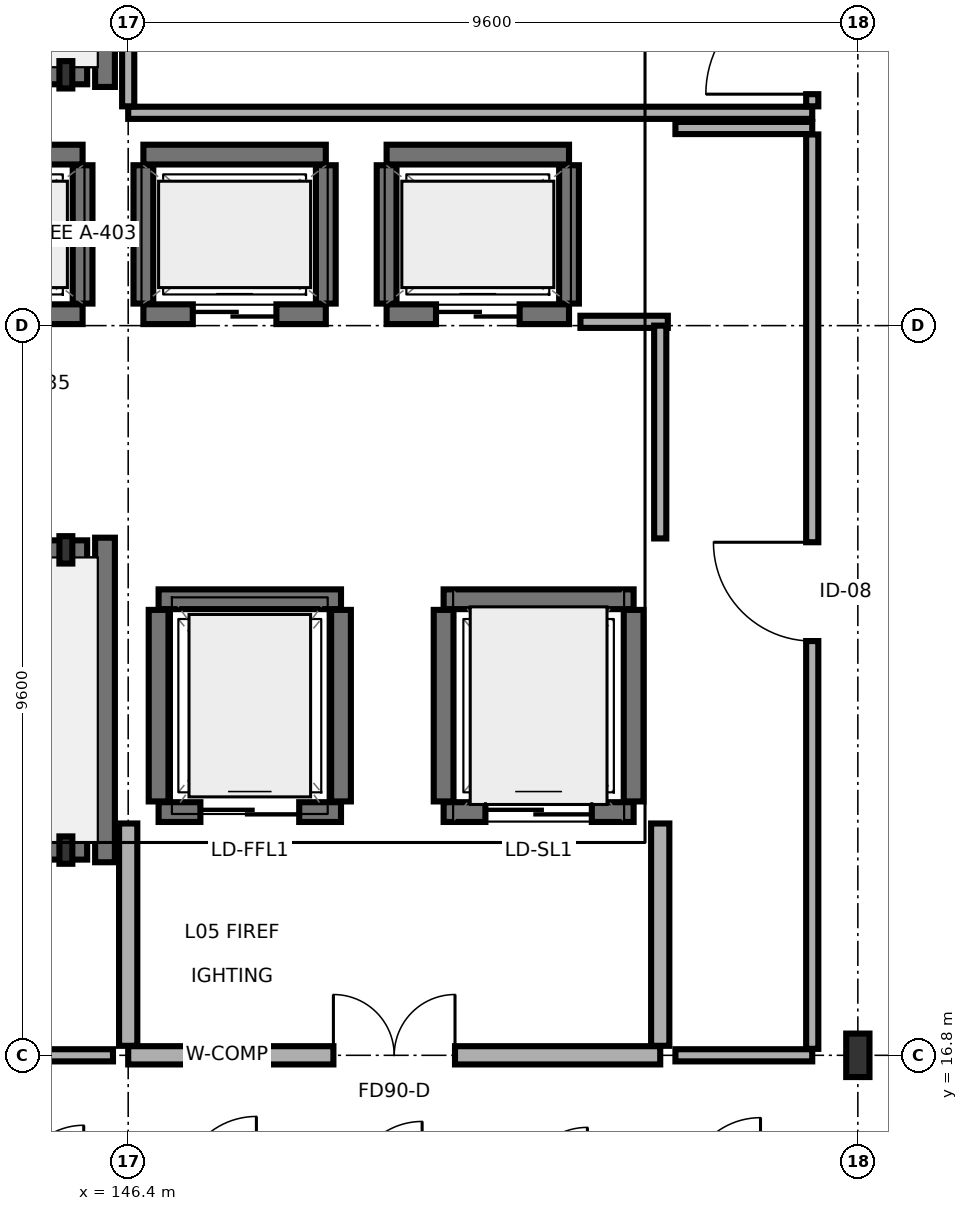
"""IFC4 building model, lengths in metres.
Left out: names, types, materials, properties, quantities, classifications, styles, units other than length and angle.
Written with IfcOpenShell. Run it as: python <this file> out.ifc"""

import sys

from ifc_helpers import new_model, si_unit, direction, frame, frame_2d, origin, origin_2d, place, context, subcontext, project, spatial, rectangle, i_section, extrude, element, fill, save


model = new_model("IFC4")
c1 = context("Model", 3, precision=1e-05, world=origin(), true_north=direction((0.0, 1.0)))
c2 = subcontext(c1, "Body", "Model", "MODEL_VIEW")
j1 = project(units=[si_unit("LENGTHUNIT", "METRE"), si_unit("PLANEANGLEUNIT", "RADIAN")], contexts=[c1])
p1 = place(None, origin())
s1 = spatial("IfcSite", under=j1, at=p1, CompositionType="ELEMENT")
p2 = place(p1, origin())
s2 = spatial("IfcBuilding", under=s1, at=p2, CompositionType="ELEMENT")
p3 = place(p2, frame((0.0, 0.0, 18.1)))
s3 = spatial("IfcBuildingStorey", under=s2, at=p3, CompositionType="ELEMENT", Elevation=18.1)
p4 = place(p3, frame((156.0, 16.8, 0.0), z_axis=(0.0, 0.0, 1.0), x_axis=(1.0, 0.0, 0.0)))
e1 = element("IfcColumn", 1, at=p4, inside=s3, PredefinedType="COLUMN", context=c2, shape_type="SweptSolid", body=[
    extrude(i_section(OverallWidth=0.306, OverallDepth=0.572, WebThickness=0.021, FlangeThickness=0.04, FilletRadius=0.027, at=origin_2d()), origin(), (0.0, 0.0, 1.0), 3.4),
])
for number, where, z_axis, x_axis in (
    (2, (145.58, 19.5, 0.0), (0.0, 0.0, 1.0), (1.0, 0.0, 0.0)),
    (3, (145.58, 23.45, 0.0), (0.0, 0.0, 1.0), (1.0, 0.0, 0.0)),
    (4, (145.58, 29.7, 0.0), (0.0, 0.0, 1.0), (1.0, 0.0, 0.0)),
):
    element("IfcColumn", number, at=place(p3, frame(where, z_axis=z_axis, x_axis=x_axis)), inside=s3, PredefinedType="PILASTER", context=c2, shape_type="SweptSolid", body=[
        extrude(i_section(OverallWidth=0.17, OverallDepth=0.36, WebThickness=0.008, FlangeThickness=0.013, FilletRadius=0.018, at=origin_2d()), origin(), (0.0, 0.0, 1.0), 3.4),
    ])
p5 = place(p3, frame((146.095, 19.34, 0.0), z_axis=(0.0, 0.0, 1.0), x_axis=(0.0, 1.0, 0.0)))
e5 = element("IfcWall", 5, at=p5, inside=s3, PredefinedType="SHEAR", context=c2, shape_type="SweptSolid", body=[
    extrude(rectangle(XDim=4.27, YDim=0.26, at=frame_2d((2.135, 0.0))), origin(), (0.0, 0.0, 1.0), 3.21),
])
for number, where, z_axis, x_axis in (
    (6, (137.34, 19.505, 0.0), (0.0, 0.0, 1.0), (1.0, 0.0, 0.0)),
    (7, (137.34, 23.445, 0.0), (0.0, 0.0, 1.0), (1.0, 0.0, 0.0)),
):
    element("IfcWall", number, at=place(p3, frame(where, z_axis=z_axis, x_axis=x_axis)), inside=s3, PredefinedType="SHEAR", context=c2, shape_type="SweptSolid", body=[
        extrude(rectangle(XDim=8.52, YDim=0.26, at=frame_2d((4.26, 0.0))), origin(), (0.0, 0.0, 1.0), 3.21),
    ])
p6 = place(p3, frame((146.095, 29.54, 0.0), z_axis=(0.0, 0.0, 1.0), x_axis=(0.0, 1.0, 0.0)))
e8 = element("IfcWall", 8, at=p6, inside=s3, PredefinedType="SHEAR", context=c2, shape_type="SweptSolid", body=[
    extrude(rectangle(XDim=4.635, YDim=0.26, at=frame_2d((2.317, 0.0))), origin(), (0.0, 0.0, 1.0), 3.21),
])
p7 = place(p3, frame((137.34, 29.705, 0.0), z_axis=(0.0, 0.0, 1.0), x_axis=(1.0, 0.0, 0.0)))
e9 = element("IfcWall", 9, at=p7, inside=s3, PredefinedType="SHEAR", context=c2, shape_type="SweptSolid", body=[
    extrude(rectangle(XDim=8.52, YDim=0.26, at=frame_2d((4.26, 0.0))), origin(), (0.0, 0.0, 1.0), 3.21),
])
p8 = place(p3, frame((143.4, 26.55, 0.0), z_axis=(0.0, 0.0, 1.0), x_axis=(1.0, 0.0, 0.0)))
e10 = element("IfcWall", 10, at=p8, inside=s3, PredefinedType="SHEAR", context=c2, shape_type="SweptSolid", body=[
    extrude(rectangle(XDim=2.4, YDim=0.26, at=frame_2d((1.2, 0.0))), origin(), (0.0, 0.0, 1.0), 3.21),
])
p9 = place(p8, frame((0.65, 0.0, 0.0)))
e11 = element("IfcOpeningElement", 11, at=p9, cuts=e10, PredefinedType="OPENING", context=c2, shape_type="SweptSolid", body=[
    extrude(rectangle(XDim=1.1, YDim=2.2, at=frame_2d((0.55, 1.1))), frame((0.0, 0.14, 0.0), z_axis=(0.0, -1.0, 0.0), x_axis=(1.0, 0.0, 0.0)), (0.0, 0.0, 1.0), 0.28),
])
p10 = place(p3, frame((143.4, 28.65, 0.0), z_axis=(0.0, 0.0, 1.0), x_axis=(1.0, 0.0, 0.0)))
e12 = element("IfcWall", 12, at=p10, inside=s3, PredefinedType="SHEAR", context=c2, shape_type="SweptSolid", body=[
    extrude(rectangle(XDim=2.4, YDim=0.26, at=frame_2d((1.2, 0.0))), origin(), (0.0, 0.0, 1.0), 3.21),
])
p11 = place(p3, frame((145.8, 26.69, 0.0), z_axis=(0.0, 0.0, 1.0), x_axis=(0.0, 1.0, 0.0)))
e13 = element("IfcWall", 13, at=p11, inside=s3, PredefinedType="SHEAR", context=c2, shape_type="SweptSolid", body=[
    extrude(rectangle(XDim=1.82, YDim=0.26, at=frame_2d((0.91, 0.0))), origin(), (0.0, 0.0, 1.0), 3.21),
])
p12 = place(p3, frame((146.6, 26.55, 0.0), z_axis=(0.0, 0.0, 1.0), x_axis=(1.0, 0.0, 0.0)))
e14 = element("IfcWall", 14, at=p12, inside=s3, PredefinedType="SHEAR", context=c2, shape_type="SweptSolid", body=[
    extrude(rectangle(XDim=2.4, YDim=0.26, at=frame_2d((1.2, 0.0))), origin(), (0.0, 0.0, 1.0), 3.21),
])
p13 = place(p12, frame((0.65, 0.0, 0.0)))
e15 = element("IfcOpeningElement", 15, at=p13, cuts=e14, PredefinedType="OPENING", context=c2, shape_type="SweptSolid", body=[
    extrude(rectangle(XDim=1.1, YDim=2.2, at=frame_2d((0.55, 1.1))), frame((0.0, 0.14, 0.0), z_axis=(0.0, -1.0, 0.0), x_axis=(1.0, 0.0, 0.0)), (0.0, 0.0, 1.0), 0.28),
])
p14 = place(p3, frame((146.6, 28.65, 0.0), z_axis=(0.0, 0.0, 1.0), x_axis=(1.0, 0.0, 0.0)))
e16 = element("IfcWall", 16, at=p14, inside=s3, PredefinedType="SHEAR", context=c2, shape_type="SweptSolid", body=[
    extrude(rectangle(XDim=2.4, YDim=0.26, at=frame_2d((1.2, 0.0))), origin(), (0.0, 0.0, 1.0), 3.21),
])
for number, where, z_axis, x_axis in (
    (17, (146.6, 26.69, 0.0), (0.0, 0.0, 1.0), (0.0, 1.0, 0.0)),
    (18, (149.0, 26.69, 0.0), (0.0, 0.0, 1.0), (0.0, 1.0, 0.0)),
):
    element("IfcWall", number, at=place(p3, frame(where, z_axis=z_axis, x_axis=x_axis)), inside=s3, PredefinedType="SHEAR", context=c2, shape_type="SweptSolid", body=[
        extrude(rectangle(XDim=1.82, YDim=0.26, at=frame_2d((0.91, 0.0))), origin(), (0.0, 0.0, 1.0), 3.21),
    ])
p15 = place(p3, frame((149.8, 26.55, 0.0), z_axis=(0.0, 0.0, 1.0), x_axis=(1.0, 0.0, 0.0)))
e19 = element("IfcWall", 19, at=p15, inside=s3, PredefinedType="SHEAR", context=c2, shape_type="SweptSolid", body=[
    extrude(rectangle(XDim=2.4, YDim=0.26, at=frame_2d((1.2, 0.0))), origin(), (0.0, 0.0, 1.0), 3.21),
])
p16 = place(p15, frame((0.65, 0.0, 0.0)))
e20 = element("IfcOpeningElement", 20, at=p16, cuts=e19, PredefinedType="OPENING", context=c2, shape_type="SweptSolid", body=[
    extrude(rectangle(XDim=1.1, YDim=2.2, at=frame_2d((0.55, 1.1))), frame((0.0, 0.14, 0.0), z_axis=(0.0, -1.0, 0.0), x_axis=(1.0, 0.0, 0.0)), (0.0, 0.0, 1.0), 0.28),
])
p17 = place(p3, frame((149.8, 28.65, 0.0), z_axis=(0.0, 0.0, 1.0), x_axis=(1.0, 0.0, 0.0)))
e21 = element("IfcWall", 21, at=p17, inside=s3, PredefinedType="SHEAR", context=c2, shape_type="SweptSolid", body=[
    extrude(rectangle(XDim=2.4, YDim=0.26, at=frame_2d((1.2, 0.0))), origin(), (0.0, 0.0, 1.0), 3.21),
])
for number, where, z_axis, x_axis in (
    (22, (149.8, 26.69, 0.0), (0.0, 0.0, 1.0), (0.0, 1.0, 0.0)),
    (23, (152.2, 26.69, 0.0), (0.0, 0.0, 1.0), (0.0, 1.0, 0.0)),
):
    element("IfcWall", number, at=place(p3, frame(where, z_axis=z_axis, x_axis=x_axis)), inside=s3, PredefinedType="SHEAR", context=c2, shape_type="SweptSolid", body=[
        extrude(rectangle(XDim=1.82, YDim=0.26, at=frame_2d((0.91, 0.0))), origin(), (0.0, 0.0, 1.0), 3.21),
    ])
p18 = place(p3, frame((146.8, 20.0, 0.0), z_axis=(0.0, 0.0, 1.0), x_axis=(1.0, 0.0, 0.0)))
e24 = element("IfcWall", 24, at=p18, inside=s3, PredefinedType="SHEAR", context=c2, shape_type="SweptSolid", body=[
    extrude(rectangle(XDim=2.4, YDim=0.26, at=frame_2d((1.2, 0.0))), origin(), (0.0, 0.0, 1.0), 3.21),
])
p19 = place(p18, frame((0.55, 0.0, 0.0)))
e25 = element("IfcOpeningElement", 25, at=p19, cuts=e24, PredefinedType="OPENING", context=c2, shape_type="SweptSolid", body=[
    extrude(rectangle(XDim=1.3, YDim=2.25, at=frame_2d((0.65, 1.125))), frame((0.0, 0.14, 0.0), z_axis=(0.0, -1.0, 0.0), x_axis=(1.0, 0.0, 0.0)), (0.0, 0.0, 1.0), 0.28),
])
p20 = place(p3, frame((146.8, 22.8, 0.0), z_axis=(0.0, 0.0, 1.0), x_axis=(1.0, 0.0, 0.0)))
e26 = element("IfcWall", 26, at=p20, inside=s3, PredefinedType="SHEAR", context=c2, shape_type="SweptSolid", body=[
    extrude(rectangle(XDim=2.4, YDim=0.26, at=frame_2d((1.2, 0.0))), origin(), (0.0, 0.0, 1.0), 3.21),
])
for number, where, z_axis, x_axis in (
    (27, (146.8, 20.14, 0.0), (0.0, 0.0, 1.0), (0.0, 1.0, 0.0)),
    (28, (149.2, 20.14, 0.0), (0.0, 0.0, 1.0), (0.0, 1.0, 0.0)),
):
    element("IfcWall", number, at=place(p3, frame(where, z_axis=z_axis, x_axis=x_axis)), inside=s3, PredefinedType="SHEAR", context=c2, shape_type="SweptSolid", body=[
        extrude(rectangle(XDim=2.52, YDim=0.26, at=frame_2d((1.26, 0.0))), origin(), (0.0, 0.0, 1.0), 3.21),
    ])
p21 = place(p3, frame((150.55, 20.0, 0.0), z_axis=(0.0, 0.0, 1.0), x_axis=(1.0, 0.0, 0.0)))
e29 = element("IfcWall", 29, at=p21, inside=s3, PredefinedType="SHEAR", context=c2, shape_type="SweptSolid", body=[
    extrude(rectangle(XDim=2.5, YDim=0.26, at=frame_2d((1.25, 0.0))), origin(), (0.0, 0.0, 1.0), 3.21),
])
p22 = place(p21, frame((0.55, 0.0, 0.0)))
e30 = element("IfcOpeningElement", 30, at=p22, cuts=e29, PredefinedType="OPENING", context=c2, shape_type="SweptSolid", body=[
    extrude(rectangle(XDim=1.4, YDim=2.3, at=frame_2d((0.7, 1.15))), frame((0.0, 0.14, 0.0), z_axis=(0.0, -1.0, 0.0), x_axis=(1.0, 0.0, 0.0)), (0.0, 0.0, 1.0), 0.28),
])
p23 = place(p3, frame((150.55, 22.8, 0.0), z_axis=(0.0, 0.0, 1.0), x_axis=(1.0, 0.0, 0.0)))
e31 = element("IfcWall", 31, at=p23, inside=s3, PredefinedType="SHEAR", context=c2, shape_type="SweptSolid", body=[
    extrude(rectangle(XDim=2.5, YDim=0.26, at=frame_2d((1.25, 0.0))), origin(), (0.0, 0.0, 1.0), 3.21),
])
for number, where, z_axis, x_axis in (
    (32, (150.55, 20.14, 0.0), (0.0, 0.0, 1.0), (0.0, 1.0, 0.0)),
    (33, (153.05, 20.14, 0.0), (0.0, 0.0, 1.0), (0.0, 1.0, 0.0)),
):
    element("IfcWall", number, at=place(p3, frame(where, z_axis=z_axis, x_axis=x_axis)), inside=s3, PredefinedType="SHEAR", context=c2, shape_type="SweptSolid", body=[
        extrude(rectangle(XDim=2.52, YDim=0.26, at=frame_2d((1.26, 0.0))), origin(), (0.0, 0.0, 1.0), 3.21),
    ])
p24 = place(p3, frame((146.4, 16.8, 0.0), z_axis=(0.0, 0.0, 1.0), x_axis=(1.0, 0.0, 0.0)))
e34 = element("IfcWall", 34, at=p24, inside=s3, PredefinedType="SOLIDWALL", context=c2, shape_type="SweptSolid", body=[
    extrude(rectangle(XDim=7.0, YDim=0.24, at=frame_2d((3.5, 0.0))), origin(), (0.0, 0.0, 1.0), 2.745),
])
p25 = place(p24, frame((2.7, 0.0, 0.0)))
e35 = element("IfcOpeningElement", 35, at=p25, cuts=e34, PredefinedType="OPENING", context=c2, shape_type="SweptSolid", body=[
    extrude(rectangle(XDim=1.6, YDim=2.2, at=frame_2d((0.8, 1.1))), frame((0.0, 0.13, 0.0), z_axis=(0.0, -1.0, 0.0), x_axis=(1.0, 0.0, 0.0)), (0.0, 0.0, 1.0), 0.26),
])
for number, where, z_axis, x_axis in (
    (36, (146.4, 16.925, 0.0), (0.0, 0.0, 1.0), (0.0, 1.0, 0.0)),
    (37, (153.4, 16.925, 0.0), (0.0, 0.0, 1.0), (0.0, 1.0, 0.0)),
):
    element("IfcWall", number, at=place(p3, frame(where, z_axis=z_axis, x_axis=x_axis)), inside=s3, PredefinedType="SOLIDWALL", context=c2, shape_type="SweptSolid", body=[
        extrude(rectangle(XDim=2.925, YDim=0.24, at=frame_2d((1.462, 0.0))), origin(), (0.0, 0.0, 1.0), 2.745),
    ])
p26 = place(p3, frame((140.55, 16.8, 0.0), z_axis=(0.0, 0.0, 1.0), x_axis=(1.0, 0.0, 0.0)))
e38 = element("IfcWall", 38, at=p26, inside=s3, PredefinedType="PARTITIONING", context=c2, shape_type="SweptSolid", body=[
    extrude(rectangle(XDim=5.65, YDim=0.16, at=frame_2d((2.825, 0.0))), origin(), (0.0, 0.0, 1.0), 2.745),
])
p27 = place(p26, frame((2.175, 0.0, 0.0)))
e39 = element("IfcOpeningElement", 39, at=p27, cuts=e38, PredefinedType="OPENING", context=c2, shape_type="SweptSolid", body=[
    extrude(rectangle(XDim=1.3, YDim=2.2, at=frame_2d((0.65, 1.1))), frame((0.0, 0.09, 0.0), z_axis=(0.0, -1.0, 0.0), x_axis=(1.0, 0.0, 0.0)), (0.0, 0.0, 1.0), 0.18),
])
p28 = place(p3, frame((146.4, 29.2, 0.0), z_axis=(0.0, 0.0, 1.0), x_axis=(1.0, 0.0, 0.0)))
e40 = element("IfcWall", 40, at=p28, inside=s3, PredefinedType="PARTITIONING", context=c2, shape_type="SweptSolid", body=[
    extrude(rectangle(XDim=9.0, YDim=0.16, at=frame_2d((4.5, 0.0))), origin(), (0.0, 0.0, 1.0), 3.21),
])
p29 = place(p3, frame((146.4, 29.285, 0.0), z_axis=(0.0, 0.0, 1.0), x_axis=(0.0, 1.0, 0.0)))
e41 = element("IfcWall", 41, at=p29, inside=s3, PredefinedType="PARTITIONING", context=c2, shape_type="SweptSolid", body=[
    extrude(rectangle(XDim=4.915, YDim=0.16, at=frame_2d((2.458, 0.0))), origin(), (0.0, 0.0, 1.0), 3.21),
])
p30 = place(p3, frame((155.4, 29.285, 0.0), z_axis=(0.0, 0.0, 1.0), x_axis=(0.0, 1.0, 0.0)))
e42 = element("IfcWall", 42, at=p30, inside=s3, PredefinedType="PARTITIONING", context=c2, shape_type="SweptSolid", body=[
    extrude(rectangle(XDim=9.03, YDim=0.16, at=frame_2d((4.515, 0.0))), origin(), (0.0, 0.0, 1.0), 3.21),
])
p31 = place(p30, frame((0.16, 0.0, 0.0)))
e43 = element("IfcOpeningElement", 43, at=p31, cuts=e42, PredefinedType="OPENING", context=c2, shape_type="SweptSolid", body=[
    extrude(rectangle(XDim=1.4, YDim=2.2, at=frame_2d((0.7, 1.1))), frame((0.0, 0.09, 0.0), z_axis=(0.0, -1.0, 0.0), x_axis=(1.0, 0.0, 0.0)), (0.0, 0.0, 1.0), 0.18),
])
p32 = place(p3, frame((153.6, 16.8, 0.0), z_axis=(0.0, 0.0, 1.0), x_axis=(1.0, 0.0, 0.0)))
e44 = element("IfcWall", 44, at=p32, inside=s3, PredefinedType="PARTITIONING", context=c2, shape_type="SweptSolid", body=[
    extrude(rectangle(XDim=1.8, YDim=0.16, at=frame_2d((0.9, 0.0))), origin(), (0.0, 0.0, 1.0), 2.745),
])
p33 = place(p3, frame((153.6, 29.0, 0.0), z_axis=(0.0, 0.0, 1.0), x_axis=(1.0, 0.0, 0.0)))
e45 = element("IfcWall", 45, at=p33, inside=s3, PredefinedType="PARTITIONING", context=c2, shape_type="SweptSolid", body=[
    extrude(rectangle(XDim=1.8, YDim=0.16, at=frame_2d((0.9, 0.0))), origin(), (0.0, 0.0, 1.0), 3.21),
])
p34 = place(p3, frame((155.4, 16.885, 0.0), z_axis=(0.0, 0.0, 1.0), x_axis=(0.0, 1.0, 0.0)))
e46 = element("IfcWall", 46, at=p34, inside=s3, PredefinedType="PARTITIONING", context=c2, shape_type="SweptSolid", body=[
    extrude(rectangle(XDim=12.03, YDim=0.16, at=frame_2d((6.015, 0.0))), origin(), (0.0, 0.0, 1.0), 2.745),
])
p35 = place(p34, frame((5.365, 0.0, 0.0)))
e47 = element("IfcOpeningElement", 47, at=p35, cuts=e46, PredefinedType="OPENING", context=c2, shape_type="SweptSolid", body=[
    extrude(rectangle(XDim=1.3, YDim=2.2, at=frame_2d((0.65, 1.1))), frame((0.0, 0.09, 0.0), z_axis=(0.0, -1.0, 0.0), x_axis=(1.0, 0.0, 0.0)), (0.0, 0.0, 1.0), 0.18),
])
p36 = place(p3, frame((152.35, 26.45, 0.0), z_axis=(0.0, 0.0, 1.0), x_axis=(1.0, 0.0, 0.0)))
e48 = element("IfcWall", 48, at=p36, inside=s3, PredefinedType="PARTITIONING", context=c2, shape_type="SweptSolid", body=[
    extrude(rectangle(XDim=1.15, YDim=0.16, at=frame_2d((0.575, 0.0))), origin(), (0.0, 0.0, 1.0), 3.21),
])
p37 = place(p3, frame((153.4, 23.6, 0.0), z_axis=(0.0, 0.0, 1.0), x_axis=(0.0, 1.0, 0.0)))
e49 = element("IfcWall", 49, at=p37, inside=s3, PredefinedType="PARTITIONING", context=c2, shape_type="SweptSolid", body=[
    extrude(rectangle(XDim=2.8, YDim=0.16, at=frame_2d((1.4, 0.0))), origin(), (0.0, 0.0, 1.0), 3.21),
])
p38 = place(p13, origin())
e50 = element("IfcDoor", 50, at=p38, inside=s3, OperationType="SLIDING_TO_RIGHT", PredefinedType="DOOR", context=c2, shape_type="SweptSolid", body=[
    extrude(rectangle(XDim=1.1, YDim=2.2, at=frame_2d((0.55, 1.1))), frame((0.0, 0.025, 0.0), z_axis=(0.0, -1.0, 0.0), x_axis=(1.0, 0.0, 0.0)), (0.0, 0.0, 1.0), 0.05),
])
fill(e15, e50)
p39 = place(p16, origin())
e51 = element("IfcDoor", 51, at=p39, inside=s3, OperationType="SLIDING_TO_LEFT", PredefinedType="DOOR", context=c2, shape_type="SweptSolid", body=[
    extrude(rectangle(XDim=1.1, YDim=2.2, at=frame_2d((0.55, 1.1))), frame((0.0, 0.025, 0.0), z_axis=(0.0, -1.0, 0.0), x_axis=(1.0, 0.0, 0.0)), (0.0, 0.0, 1.0), 0.05),
])
fill(e20, e51)
p40 = place(p19, origin())
e52 = element("IfcDoor", 52, at=p40, inside=s3, OperationType="SLIDING_TO_RIGHT", PredefinedType="DOOR", context=c2, shape_type="SweptSolid", body=[
    extrude(rectangle(XDim=1.3, YDim=2.25, at=frame_2d((0.65, 1.125))), frame((0.0, 0.025, 0.0), z_axis=(0.0, -1.0, 0.0), x_axis=(1.0, 0.0, 0.0)), (0.0, 0.0, 1.0), 0.05),
])
fill(e25, e52)
p41 = place(p22, origin())
e53 = element("IfcDoor", 53, at=p41, inside=s3, OperationType="SLIDING_TO_LEFT", PredefinedType="DOOR", context=c2, shape_type="SweptSolid", body=[
    extrude(rectangle(XDim=1.4, YDim=2.3, at=frame_2d((0.7, 1.15))), frame((0.0, 0.025, 0.0), z_axis=(0.0, -1.0, 0.0), x_axis=(1.0, 0.0, 0.0)), (0.0, 0.0, 1.0), 0.05),
])
fill(e30, e53)
p42 = place(p25, origin())
e54 = element("IfcDoor", 54, at=p42, inside=s3, OperationType="DOUBLE_DOOR_SINGLE_SWING", PredefinedType="DOOR", context=c2, shape_type="SweptSolid", body=[
    extrude(rectangle(XDim=1.6, YDim=2.2, at=frame_2d((0.8, 1.1))), frame((0.0, 0.025, 0.0), z_axis=(0.0, -1.0, 0.0), x_axis=(1.0, 0.0, 0.0)), (0.0, 0.0, 1.0), 0.05),
])
fill(e35, e54)
p43 = place(p31, origin())
e55 = element("IfcDoor", 55, at=p43, inside=s3, OperationType="SINGLE_SWING_LEFT", PredefinedType="DOOR", context=c2, shape_type="SweptSolid", body=[
    extrude(rectangle(XDim=1.4, YDim=2.2, at=frame_2d((0.7, 1.1))), frame((0.0, 0.025, 0.0), z_axis=(0.0, -1.0, 0.0), x_axis=(1.0, 0.0, 0.0)), (0.0, 0.0, 1.0), 0.05),
])
fill(e43, e55)
p44 = place(p35, origin())
e56 = element("IfcDoor", 56, at=p44, inside=s3, OperationType="SINGLE_SWING_RIGHT", PredefinedType="DOOR", context=c2, shape_type="SweptSolid", body=[
    extrude(rectangle(XDim=1.3, YDim=2.2, at=frame_2d((0.65, 1.1))), frame((0.0, 0.025, 0.0), z_axis=(0.0, -1.0, 0.0), x_axis=(1.0, 0.0, 0.0)), (0.0, 0.0, 1.0), 0.05),
])
fill(e47, e56)
save(model, sys.argv[1])
